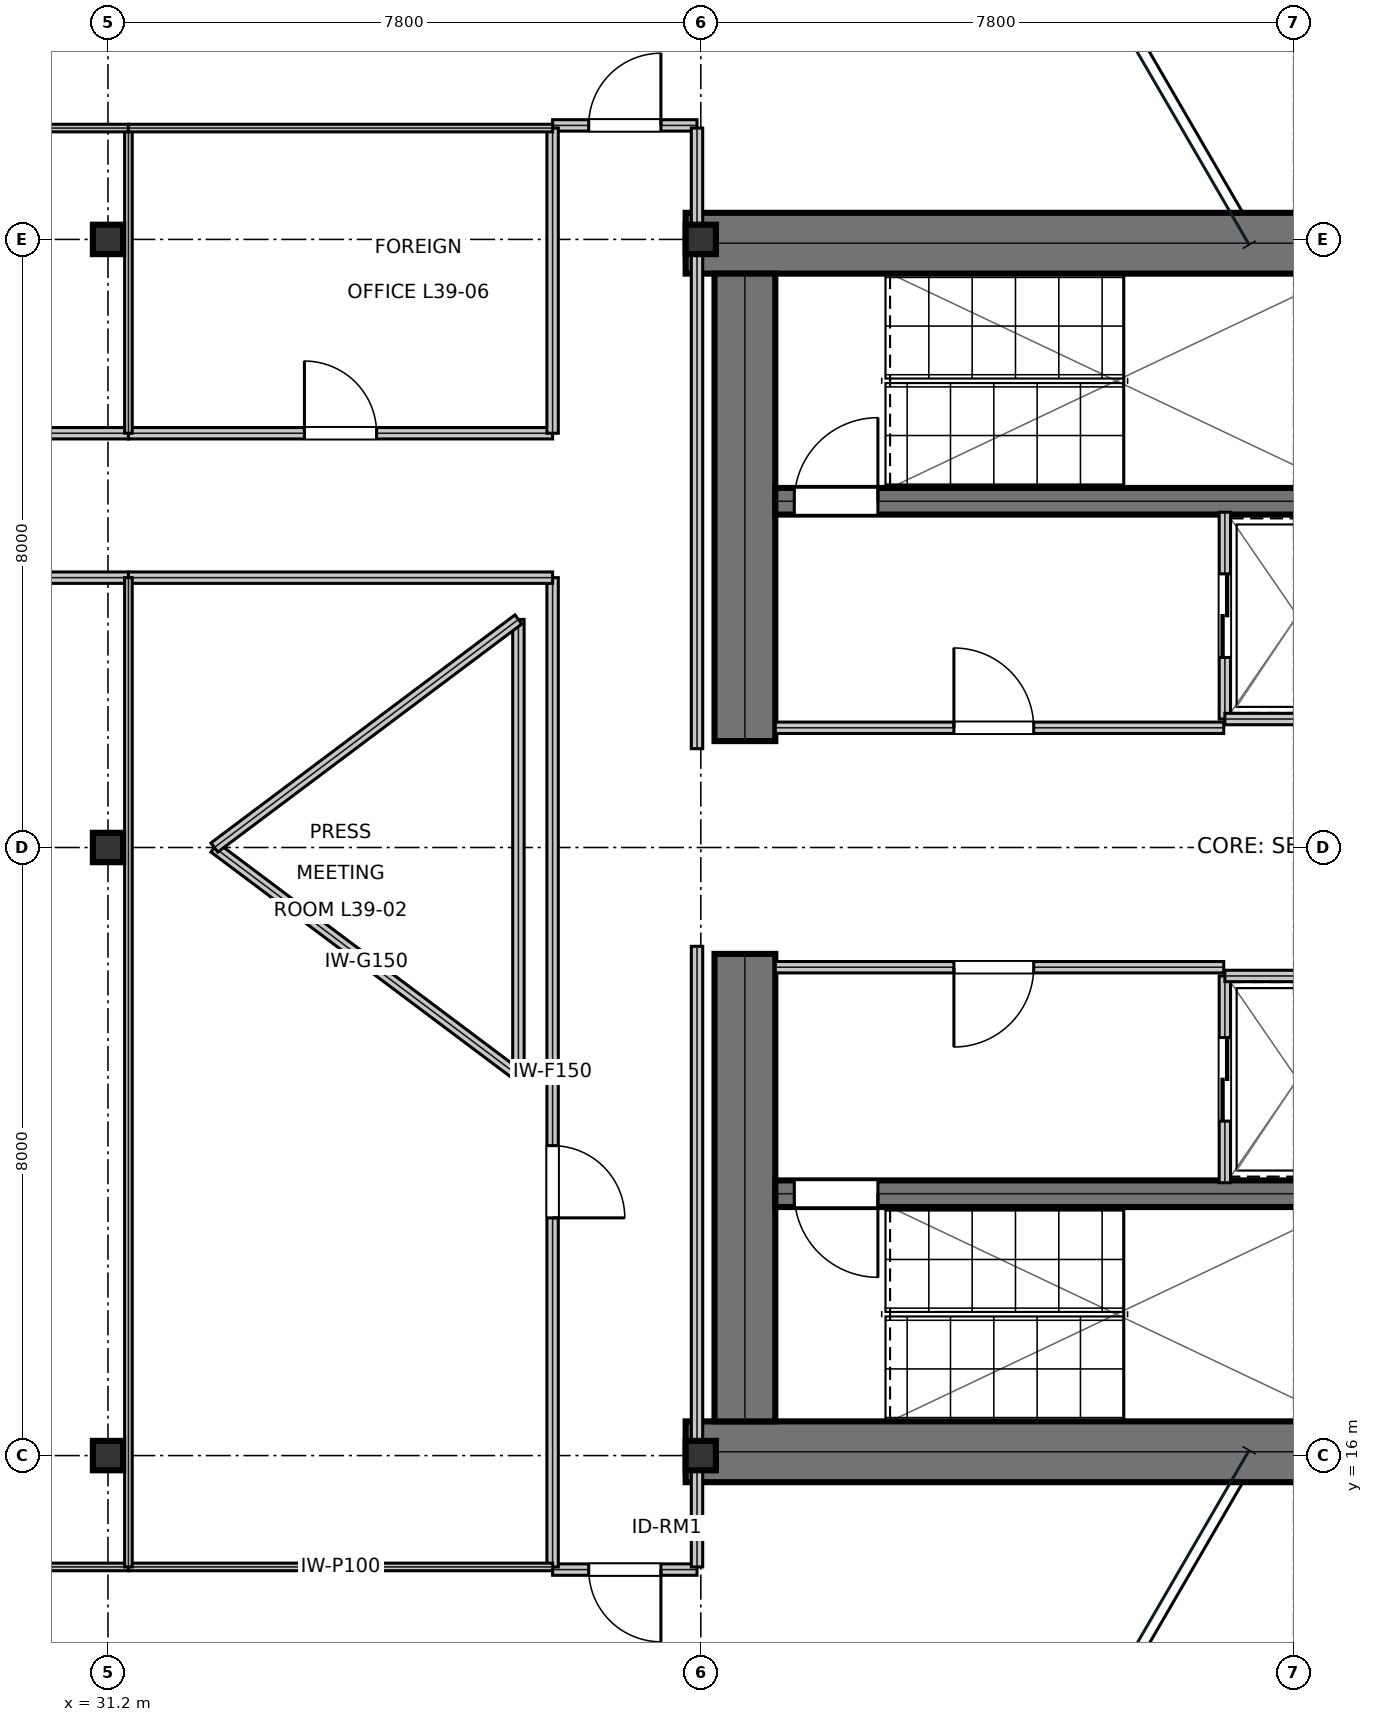
"""IFC4 building model, lengths in metres.
Left out: names, types, materials, properties, quantities, classifications, styles, units other than length and angle.
Written with IfcOpenShell. Run it as: python <this file> out.ifc"""

import sys

from ifc_helpers import new_model, si_unit, direction, frame, frame_2d, origin, origin_2d, place, context, subcontext, project, spatial, rectangle, i_section, extrude, element, fill, save


model = new_model("IFC4")
c1 = context("Model", 3, precision=1e-05, world=origin(), true_north=direction((0.0, 1.0)))
c2 = subcontext(c1, "Body", "Model", "MODEL_VIEW")
j1 = project(units=[si_unit("LENGTHUNIT", "METRE"), si_unit("PLANEANGLEUNIT", "RADIAN")], contexts=[c1])
p1 = place(None, origin())
s1 = spatial("IfcSite", under=j1, at=p1, CompositionType="ELEMENT")
p2 = place(p1, origin())
s2 = spatial("IfcBuilding", under=s1, at=p2, CompositionType="ELEMENT")
p3 = place(p2, frame((0.0, 0.0, 169.5)))
s3 = spatial("IfcBuildingStorey", under=s2, at=p3, CompositionType="ELEMENT", Elevation=169.5)
for number, where, z_axis, x_axis in (
    (1, (38.8, 31.95, 0.0), (0.0, 0.0, 1.0), (1.0, 0.0, 0.0)),
    (2, (38.8, 16.05, 0.0), (0.0, 0.0, 1.0), (1.0, 0.0, 0.0)),
):
    element("IfcWall", number, at=place(p3, frame(where, z_axis=z_axis, x_axis=x_axis)), inside=s3, PredefinedType="SHEAR", context=c2, shape_type="SweptSolid", body=[
        extrude(rectangle(XDim=16.0, YDim=0.8, at=frame_2d((8.0, 0.0))), origin(), (0.0, 0.0, 1.0), 3.81),
    ])
for number, where, z_axis, x_axis in (
    (3, (39.58, 16.45, 0.0), (0.0, 0.0, 1.0), (0.0, 1.0, 0.0)),
    (4, (39.58, 25.4, 0.0), (0.0, 0.0, 1.0), (0.0, 1.0, 0.0)),
):
    element("IfcWall", number, at=place(p3, frame(where, z_axis=z_axis, x_axis=x_axis)), inside=s3, PredefinedType="SHEAR", context=c2, shape_type="SweptSolid", body=[
        extrude(rectangle(XDim=6.15, YDim=0.8, at=frame_2d((3.075, 0.0))), origin(), (0.0, 0.0, 1.0), 3.81),
    ])
p4 = place(p3, frame((39.98, 28.555, 0.0), z_axis=(0.0, 0.0, 1.0), x_axis=(1.0, 0.0, 0.0)))
e5 = element("IfcWall", 5, at=p4, inside=s3, PredefinedType="SHEAR", context=c2, shape_type="SweptSolid", body=[
    extrude(rectangle(XDim=7.71, YDim=0.35, at=frame_2d((3.855, 0.0))), origin(), (0.0, 0.0, 1.0), 3.81),
])
p5 = place(p4, frame((0.25, 0.0, 0.0)))
e6 = element("IfcOpeningElement", 6, at=p5, cuts=e5, PredefinedType="OPENING", context=c2, shape_type="SweptSolid", body=[
    extrude(rectangle(XDim=1.1, YDim=2.15, at=frame_2d((0.55, 1.075))), frame((0.0, 0.185, 0.0), z_axis=(0.0, -1.0, 0.0), x_axis=(1.0, 0.0, 0.0)), (0.0, 0.0, 1.0), 0.37),
])
p6 = place(p3, frame((39.98, 19.445, 0.0), z_axis=(0.0, 0.0, 1.0), x_axis=(1.0, 0.0, 0.0)))
e7 = element("IfcWall", 7, at=p6, inside=s3, PredefinedType="SHEAR", context=c2, shape_type="SweptSolid", body=[
    extrude(rectangle(XDim=7.71, YDim=0.35, at=frame_2d((3.855, 0.0))), origin(), (0.0, 0.0, 1.0), 3.81),
])
p7 = place(p6, frame((0.25, 0.0, 0.0)))
e8 = element("IfcOpeningElement", 8, at=p7, cuts=e7, PredefinedType="OPENING", context=c2, shape_type="SweptSolid", body=[
    extrude(rectangle(XDim=1.1, YDim=2.15, at=frame_2d((0.55, 1.075))), frame((0.0, 0.185, 0.0), z_axis=(0.0, -1.0, 0.0), x_axis=(1.0, 0.0, 0.0)), (0.0, 0.0, 1.0), 0.37),
])
for number, where, z_axis, x_axis in (
    (9, (31.2, 16.0, 0.0), (0.0, 0.0, 1.0), (1.0, 0.0, 0.0)),
    (10, (31.2, 24.0, 0.0), (0.0, 0.0, 1.0), (1.0, 0.0, 0.0)),
    (11, (31.2, 32.0, 0.0), (0.0, 0.0, 1.0), (1.0, 0.0, 0.0)),
    (12, (39.0, 16.0, 0.0), (0.0, 0.0, 1.0), (1.0, 0.0, 0.0)),
    (13, (39.0, 32.0, 0.0), (0.0, 0.0, 1.0), (1.0, 0.0, 0.0)),
):
    element("IfcColumn", number, at=place(p3, frame(where, z_axis=z_axis, x_axis=x_axis)), inside=s3, PredefinedType="COLUMN", context=c2, shape_type="SweptSolid", body=[
        extrude(i_section(OverallWidth=0.398, OverallDepth=0.387, WebThickness=0.021, FlangeThickness=0.033, at=origin_2d()), origin(), (0.0, 0.0, 1.0), 4.044),
    ])
p8 = place(p3, frame((39.98, 25.575, 0.0), z_axis=(0.0, 0.0, 1.0), x_axis=(1.0, 0.0, 0.0)))
e14 = element("IfcWall", 14, at=p8, inside=s3, PredefinedType="PARTITIONING", context=c2, shape_type="SweptSolid", body=[
    extrude(rectangle(XDim=5.9, YDim=0.15, at=frame_2d((2.95, 0.0))), origin(), (0.0, 0.0, 1.0), 3.81),
])
p9 = place(p8, frame((2.35, 0.0, 0.0)))
e15 = element("IfcOpeningElement", 15, at=p9, cuts=e14, PredefinedType="OPENING", context=c2, shape_type="SweptSolid", body=[
    extrude(rectangle(XDim=1.05, YDim=2.15, at=frame_2d((0.525, 1.075))), frame((0.0, 0.085, 0.0), z_axis=(0.0, -1.0, 0.0), x_axis=(1.0, 0.0, 0.0)), (0.0, 0.0, 1.0), 0.17),
])
p10 = place(p3, frame((39.98, 22.425, 0.0), z_axis=(0.0, 0.0, 1.0), x_axis=(1.0, 0.0, 0.0)))
e16 = element("IfcWall", 16, at=p10, inside=s3, PredefinedType="PARTITIONING", context=c2, shape_type="SweptSolid", body=[
    extrude(rectangle(XDim=5.9, YDim=0.15, at=frame_2d((2.95, 0.0))), origin(), (0.0, 0.0, 1.0), 3.81),
])
p11 = place(p10, frame((2.35, 0.0, 0.0)))
e17 = element("IfcOpeningElement", 17, at=p11, cuts=e16, PredefinedType="OPENING", context=c2, shape_type="SweptSolid", body=[
    extrude(rectangle(XDim=1.05, YDim=2.15, at=frame_2d((0.525, 1.075))), frame((0.0, 0.085, 0.0), z_axis=(0.0, -1.0, 0.0), x_axis=(1.0, 0.0, 0.0)), (0.0, 0.0, 1.0), 0.17),
])
p12 = place(p3, frame((45.895, 25.69, 0.0), z_axis=(0.0, 0.0, 1.0), x_axis=(0.0, 1.0, 0.0)))
e18 = element("IfcWall", 18, at=p12, inside=s3, PredefinedType="PARTITIONING", context=c2, shape_type="SweptSolid", body=[
    extrude(rectangle(XDim=2.72, YDim=0.15, at=frame_2d((1.36, 0.0))), origin(), (0.0, 0.0, 1.0), 3.81),
])
p13 = place(p12, frame((0.81, 0.0, 0.0)))
e19 = element("IfcOpeningElement", 19, at=p13, cuts=e18, PredefinedType="OPENING", context=c2, shape_type="SweptSolid", body=[
    extrude(rectangle(XDim=1.1, YDim=2.15, at=frame_2d((0.55, 1.075))), frame((0.0, 0.085, 0.0), z_axis=(0.0, -1.0, 0.0), x_axis=(1.0, 0.0, 0.0)), (0.0, 0.0, 1.0), 0.17),
])
p14 = place(p3, frame((45.895, 25.69, 0.0), z_axis=(0.0, 0.0, 1.0), x_axis=(1.0, 0.0, 0.0)))
e20 = element("IfcWall", 20, at=p14, inside=s3, PredefinedType="PARTITIONING", context=c2, shape_type="SweptSolid", body=[
    extrude(rectangle(XDim=1.915, YDim=0.15, at=frame_2d((0.958, 0.0))), origin(), (0.0, 0.0, 1.0), 3.81),
])
p15 = place(p3, frame((45.895, 19.59, 0.0), z_axis=(0.0, 0.0, 1.0), x_axis=(0.0, 1.0, 0.0)))
e21 = element("IfcWall", 21, at=p15, inside=s3, PredefinedType="PARTITIONING", context=c2, shape_type="SweptSolid", body=[
    extrude(rectangle(XDim=2.72, YDim=0.15, at=frame_2d((1.36, 0.0))), origin(), (0.0, 0.0, 1.0), 3.81),
])
p16 = place(p15, frame((0.81, 0.0, 0.0)))
e22 = element("IfcOpeningElement", 22, at=p16, cuts=e21, PredefinedType="OPENING", context=c2, shape_type="SweptSolid", body=[
    extrude(rectangle(XDim=1.1, YDim=2.15, at=frame_2d((0.55, 1.075))), frame((0.0, 0.085, 0.0), z_axis=(0.0, -1.0, 0.0), x_axis=(1.0, 0.0, 0.0)), (0.0, 0.0, 1.0), 0.17),
])
p17 = place(p3, frame((45.895, 22.31, 0.0), z_axis=(0.0, 0.0, 1.0), x_axis=(1.0, 0.0, 0.0)))
e23 = element("IfcWall", 23, at=p17, inside=s3, PredefinedType="PARTITIONING", context=c2, shape_type="SweptSolid", body=[
    extrude(rectangle(XDim=1.915, YDim=0.15, at=frame_2d((0.958, 0.0))), origin(), (0.0, 0.0, 1.0), 3.81),
])
p18 = place(p3, frame((37.05, 14.5, 0.0), z_axis=(0.0, 0.0, 1.0), x_axis=(1.0, 0.0, 0.0)))
e24 = element("IfcWall", 24, at=p18, inside=s3, PredefinedType="PARTITIONING", context=c2, shape_type="SweptSolid", body=[
    extrude(rectangle(XDim=1.9, YDim=0.15, at=frame_2d((0.95, 0.0))), origin(), (0.0, 0.0, 1.0), 3.19),
])
p19 = place(p18, frame((0.475, 0.0, 0.0)))
e25 = element("IfcOpeningElement", 25, at=p19, cuts=e24, PredefinedType="OPENING", context=c2, shape_type="SweptSolid", body=[
    extrude(rectangle(XDim=0.95, YDim=2.15, at=frame_2d((0.475, 1.075))), frame((0.0, 0.085, 0.0), z_axis=(0.0, -1.0, 0.0), x_axis=(1.0, 0.0, 0.0)), (0.0, 0.0, 1.0), 0.17),
])
p20 = place(p3, frame((37.05, 14.535, 0.0), z_axis=(0.0, 0.0, 1.0), x_axis=(0.0, 1.0, 0.0)))
e26 = element("IfcWall", 26, at=p20, inside=s3, PredefinedType="PARTITIONING", context=c2, shape_type="SweptSolid", body=[
    extrude(rectangle(XDim=13.015, YDim=0.15, at=frame_2d((6.508, 0.0))), origin(), (0.0, 0.0, 1.0), 3.19),
])
p21 = place(p20, frame((4.593, 0.0, 0.0)))
e27 = element("IfcOpeningElement", 27, at=p21, cuts=e26, PredefinedType="OPENING", context=c2, shape_type="SweptSolid", body=[
    extrude(rectangle(XDim=0.95, YDim=2.15, at=frame_2d((0.475, 1.075))), frame((0.0, 0.085, 0.0), z_axis=(0.0, -1.0, 0.0), x_axis=(1.0, 0.0, 0.0)), (0.0, 0.0, 1.0), 0.17),
])
p22 = place(p3, frame((31.469, 29.45, 0.0), z_axis=(0.0, 0.0, 1.0), x_axis=(1.0, 0.0, 0.0)))
e28 = element("IfcWall", 28, at=p22, inside=s3, PredefinedType="PARTITIONING", context=c2, shape_type="SweptSolid", body=[
    extrude(rectangle(XDim=5.581, YDim=0.15, at=frame_2d((2.791, 0.0))), origin(), (0.0, 0.0, 1.0), 3.81),
])
p23 = place(p22, frame((2.315, 0.0, 0.0)))
e29 = element("IfcOpeningElement", 29, at=p23, cuts=e28, PredefinedType="OPENING", context=c2, shape_type="SweptSolid", body=[
    extrude(rectangle(XDim=0.95, YDim=2.15, at=frame_2d((0.475, 1.075))), frame((0.0, 0.085, 0.0), z_axis=(0.0, -1.0, 0.0), x_axis=(1.0, 0.0, 0.0)), (0.0, 0.0, 1.0), 0.17),
])
p24 = place(p3, frame((37.05, 33.5, 0.0), z_axis=(0.0, 0.0, 1.0), x_axis=(1.0, 0.0, 0.0)))
e30 = element("IfcWall", 30, at=p24, inside=s3, PredefinedType="PARTITIONING", context=c2, shape_type="SweptSolid", body=[
    extrude(rectangle(XDim=1.9, YDim=0.15, at=frame_2d((0.95, 0.0))), origin(), (0.0, 0.0, 1.0), 3.19),
])
p25 = place(p24, frame((0.475, 0.0, 0.0)))
e31 = element("IfcOpeningElement", 31, at=p25, cuts=e30, PredefinedType="OPENING", context=c2, shape_type="SweptSolid", body=[
    extrude(rectangle(XDim=0.95, YDim=2.15, at=frame_2d((0.475, 1.075))), frame((0.0, 0.085, 0.0), z_axis=(0.0, -1.0, 0.0), x_axis=(1.0, 0.0, 0.0)), (0.0, 0.0, 1.0), 0.17),
])
p26 = place(p3, frame((38.95, 14.535, 0.0), z_axis=(0.0, 0.0, 1.0), x_axis=(0.0, 1.0, 0.0)))
e32 = element("IfcWall", 32, at=p26, inside=s3, PredefinedType="PARTITIONING", context=c2, shape_type="SweptSolid", body=[
    extrude(rectangle(XDim=8.165, YDim=0.15, at=frame_2d((4.083, 0.0))), origin(), (0.0, 0.0, 1.0), 3.19),
])
p27 = place(p3, frame((31.469, 27.55, 0.0), z_axis=(0.0, 0.0, 1.0), x_axis=(1.0, 0.0, 0.0)))
e33 = element("IfcWall", 33, at=p27, inside=s3, PredefinedType="PARTITIONING", context=c2, shape_type="SweptSolid", body=[
    extrude(rectangle(XDim=5.581, YDim=0.15, at=frame_2d((2.791, 0.0))), origin(), (0.0, 0.0, 1.0), 3.443),
])
for number, where, z_axis, x_axis in (
    (34, (29.4, 27.55, 0.0), (0.0, 0.0, 1.0), (1.0, 0.0, 0.0)),
    (35, (29.4, 29.45, 0.0), (0.0, 0.0, 1.0), (1.0, 0.0, 0.0)),
):
    element("IfcWall", number, at=place(p3, frame(where, z_axis=z_axis, x_axis=x_axis)), inside=s3, PredefinedType="PARTITIONING", context=c2, shape_type="SweptSolid", body=[
        extrude(rectangle(XDim=2.069, YDim=0.15, at=frame_2d((1.035, 0.0))), origin(), (0.0, 0.0, 1.0), 3.19),
    ])
p28 = place(p3, frame((37.05, 29.45, 0.0), z_axis=(0.0, 0.0, 1.0), x_axis=(0.0, 1.0, 0.0)))
e36 = element("IfcWall", 36, at=p28, inside=s3, PredefinedType="PARTITIONING", context=c2, shape_type="SweptSolid", body=[
    extrude(rectangle(XDim=4.015, YDim=0.15, at=frame_2d((2.008, 0.0))), origin(), (0.0, 0.0, 1.0), 3.19),
])
p29 = place(p3, frame((38.95, 25.3, 0.0), z_axis=(0.0, 0.0, 1.0), x_axis=(0.0, 1.0, 0.0)))
e37 = element("IfcWall", 37, at=p29, inside=s3, PredefinedType="PARTITIONING", context=c2, shape_type="SweptSolid", body=[
    extrude(rectangle(XDim=8.165, YDim=0.15, at=frame_2d((4.083, 0.0))), origin(), (0.0, 0.0, 1.0), 3.19),
])
p30 = place(p3, frame((31.469, 14.535, 0.0), z_axis=(0.0, 0.0, 1.0), x_axis=(1.0, 0.0, 0.0)))
e38 = element("IfcWall", 38, at=p30, inside=s3, PredefinedType="PARTITIONING", context=c2, shape_type="SweptSolid", body=[
    extrude(rectangle(XDim=5.581, YDim=0.1, at=frame_2d((2.791, 0.0))), origin(), (0.0, 0.0, 1.0), 3.81),
])
p31 = place(p3, frame((29.205, 14.535, 0.0), z_axis=(0.0, 0.0, 1.0), x_axis=(1.0, 0.0, 0.0)))
e39 = element("IfcWall", 39, at=p31, inside=s3, PredefinedType="PARTITIONING", context=c2, shape_type="SweptSolid", body=[
    extrude(rectangle(XDim=2.264, YDim=0.1, at=frame_2d((1.132, 0.0))), origin(), (0.0, 0.0, 1.0), 3.81),
])
p32 = place(p3, frame((31.469, 14.535, 0.0), z_axis=(0.0, 0.0, 1.0), x_axis=(0.0, 1.0, 0.0)))
e40 = element("IfcWall", 40, at=p32, inside=s3, PredefinedType="PARTITIONING", context=c2, shape_type="SweptSolid", body=[
    extrude(rectangle(XDim=13.015, YDim=0.1, at=frame_2d((6.508, 0.0))), origin(), (0.0, 0.0, 1.0), 3.19),
])
p33 = place(p3, frame((31.469, 29.45, 0.0), z_axis=(0.0, 0.0, 1.0), x_axis=(0.0, 1.0, 0.0)))
e41 = element("IfcWall", 41, at=p33, inside=s3, PredefinedType="PARTITIONING", context=c2, shape_type="SweptSolid", body=[
    extrude(rectangle(XDim=4.015, YDim=0.1, at=frame_2d((2.008, 0.0))), origin(), (0.0, 0.0, 1.0), 3.19),
])
p34 = place(p3, frame((29.205, 33.465, 0.0), z_axis=(0.0, 0.0, 1.0), x_axis=(1.0, 0.0, 0.0)))
e42 = element("IfcWall", 42, at=p34, inside=s3, PredefinedType="PARTITIONING", context=c2, shape_type="SweptSolid", body=[
    extrude(rectangle(XDim=2.264, YDim=0.1, at=frame_2d((1.132, 0.0))), origin(), (0.0, 0.0, 1.0), 3.81),
])
p35 = place(p3, frame((31.469, 33.465, 0.0), z_axis=(0.0, 0.0, 1.0), x_axis=(1.0, 0.0, 0.0)))
e43 = element("IfcWall", 43, at=p35, inside=s3, PredefinedType="PARTITIONING", context=c2, shape_type="SweptSolid", body=[
    extrude(rectangle(XDim=5.581, YDim=0.1, at=frame_2d((2.791, 0.0))), origin(), (0.0, 0.0, 1.0), 3.81),
])
p36 = place(p3, frame((32.6, 24.0, 0.0), z_axis=(0.0, 0.0, 1.0), x_axis=(0.8, -0.6, 0.0)))
e44 = element("IfcWall", 44, at=p36, inside=s3, PredefinedType="MOVABLE", context=c2, shape_type="SweptSolid", body=[
    extrude(rectangle(XDim=5.0, YDim=0.15, at=frame_2d((2.5, 0.0))), origin(), (0.0, 0.0, 1.0), 3.81),
])
p37 = place(p3, frame((36.6, 21.0, 0.0), z_axis=(0.0, 0.0, 1.0), x_axis=(0.0, 1.0, 0.0)))
e45 = element("IfcWall", 45, at=p37, inside=s3, PredefinedType="MOVABLE", context=c2, shape_type="SweptSolid", body=[
    extrude(rectangle(XDim=6.0, YDim=0.15, at=frame_2d((3.0, 0.0))), origin(), (0.0, 0.0, 1.0), 3.81),
])
p38 = place(p3, frame((36.6, 27.0, 0.0), z_axis=(0.0, 0.0, 1.0), x_axis=(-0.8, -0.6, 0.0)))
e46 = element("IfcWall", 46, at=p38, inside=s3, PredefinedType="MOVABLE", context=c2, shape_type="SweptSolid", body=[
    extrude(rectangle(XDim=5.0, YDim=0.15, at=frame_2d((2.5, 0.0))), origin(), (0.0, 0.0, 1.0), 3.81),
])
p39 = place(p9, origin())
e47 = element("IfcDoor", 47, at=p39, inside=s3, OperationType="SINGLE_SWING_LEFT", PredefinedType="DOOR", context=c2, shape_type="SweptSolid", body=[
    extrude(rectangle(XDim=1.05, YDim=2.15, at=frame_2d((0.525, 1.075))), frame((0.0, 0.025, 0.0), z_axis=(0.0, -1.0, 0.0), x_axis=(1.0, 0.0, 0.0)), (0.0, 0.0, 1.0), 0.05),
])
fill(e15, e47)
p40 = place(p11, frame((1.05, 0.0, 0.0), z_axis=(0.0, 0.0, 1.0), x_axis=(-1.0, 0.0, 0.0)))
e48 = element("IfcDoor", 48, at=p40, inside=s3, OperationType="SINGLE_SWING_RIGHT", PredefinedType="DOOR", context=c2, shape_type="SweptSolid", body=[
    extrude(rectangle(XDim=1.05, YDim=2.15, at=frame_2d((0.525, 1.075))), frame((0.0, 0.025, 0.0), z_axis=(0.0, -1.0, 0.0), x_axis=(1.0, 0.0, 0.0)), (0.0, 0.0, 1.0), 0.05),
])
fill(e17, e48)
p41 = place(p13, frame((1.1, 0.0, 0.0), z_axis=(0.0, 0.0, 1.0), x_axis=(-1.0, 0.0, 0.0)))
e49 = element("IfcDoor", 49, at=p41, inside=s3, OperationType="DOUBLE_DOOR_SLIDING", PredefinedType="DOOR", context=c2, shape_type="SweptSolid", body=[
    extrude(rectangle(XDim=1.1, YDim=2.15, at=frame_2d((0.55, 1.075))), frame((0.0, 0.025, 0.0), z_axis=(0.0, -1.0, 0.0), x_axis=(1.0, 0.0, 0.0)), (0.0, 0.0, 1.0), 0.05),
])
fill(e19, e49)
p42 = place(p16, frame((1.1, 0.0, 0.0), z_axis=(0.0, 0.0, 1.0), x_axis=(-1.0, 0.0, 0.0)))
e50 = element("IfcDoor", 50, at=p42, inside=s3, OperationType="DOUBLE_DOOR_SLIDING", PredefinedType="DOOR", context=c2, shape_type="SweptSolid", body=[
    extrude(rectangle(XDim=1.1, YDim=2.15, at=frame_2d((0.55, 1.075))), frame((0.0, 0.025, 0.0), z_axis=(0.0, -1.0, 0.0), x_axis=(1.0, 0.0, 0.0)), (0.0, 0.0, 1.0), 0.05),
])
fill(e22, e50)
p43 = place(p19, frame((0.95, 0.0, 0.0), z_axis=(0.0, 0.0, 1.0), x_axis=(-1.0, 0.0, 0.0)))
e51 = element("IfcDoor", 51, at=p43, inside=s3, OperationType="SINGLE_SWING_LEFT", PredefinedType="DOOR", context=c2, shape_type="SweptSolid", body=[
    extrude(rectangle(XDim=0.95, YDim=2.15, at=frame_2d((0.475, 1.075))), frame((0.0, 0.025, 0.0), z_axis=(0.0, -1.0, 0.0), x_axis=(1.0, 0.0, 0.0)), (0.0, 0.0, 1.0), 0.05),
])
fill(e25, e51)
p44 = place(p21, frame((0.95, 0.0, 0.0), z_axis=(0.0, 0.0, 1.0), x_axis=(-1.0, 0.0, 0.0)))
e52 = element("IfcDoor", 52, at=p44, inside=s3, OperationType="SINGLE_SWING_RIGHT", PredefinedType="DOOR", context=c2, shape_type="SweptSolid", body=[
    extrude(rectangle(XDim=0.95, YDim=2.15, at=frame_2d((0.475, 1.075))), frame((0.0, 0.025, 0.0), z_axis=(0.0, -1.0, 0.0), x_axis=(1.0, 0.0, 0.0)), (0.0, 0.0, 1.0), 0.05),
])
fill(e27, e52)
p45 = place(p23, origin())
e53 = element("IfcDoor", 53, at=p45, inside=s3, OperationType="SINGLE_SWING_LEFT", PredefinedType="DOOR", context=c2, shape_type="SweptSolid", body=[
    extrude(rectangle(XDim=0.95, YDim=2.15, at=frame_2d((0.475, 1.075))), frame((0.0, 0.025, 0.0), z_axis=(0.0, -1.0, 0.0), x_axis=(1.0, 0.0, 0.0)), (0.0, 0.0, 1.0), 0.05),
])
fill(e29, e53)
p46 = place(p25, origin())
e54 = element("IfcDoor", 54, at=p46, inside=s3, OperationType="SINGLE_SWING_RIGHT", PredefinedType="DOOR", context=c2, shape_type="SweptSolid", body=[
    extrude(rectangle(XDim=0.95, YDim=2.15, at=frame_2d((0.475, 1.075))), frame((0.0, 0.025, 0.0), z_axis=(0.0, -1.0, 0.0), x_axis=(1.0, 0.0, 0.0)), (0.0, 0.0, 1.0), 0.05),
])
fill(e31, e54)
p47 = place(p5, origin())
e55 = element("IfcDoor", 55, at=p47, inside=s3, OperationType="SINGLE_SWING_RIGHT", PredefinedType="DOOR", context=c2, shape_type="SweptSolid", body=[
    extrude(rectangle(XDim=1.1, YDim=2.15, at=frame_2d((0.55, 1.075))), frame((0.0, 0.025, 0.0), z_axis=(0.0, -1.0, 0.0), x_axis=(1.0, 0.0, 0.0)), (0.0, 0.0, 1.0), 0.05),
])
fill(e6, e55)
p48 = place(p7, frame((1.1, 0.0, 0.0), z_axis=(0.0, 0.0, 1.0), x_axis=(-1.0, 0.0, 0.0)))
e56 = element("IfcDoor", 56, at=p48, inside=s3, OperationType="SINGLE_SWING_LEFT", PredefinedType="DOOR", context=c2, shape_type="SweptSolid", body=[
    extrude(rectangle(XDim=1.1, YDim=2.15, at=frame_2d((0.55, 1.075))), frame((0.0, 0.025, 0.0), z_axis=(0.0, -1.0, 0.0), x_axis=(1.0, 0.0, 0.0)), (0.0, 0.0, 1.0), 0.05),
])
fill(e8, e56)
save(model, sys.argv[1])
